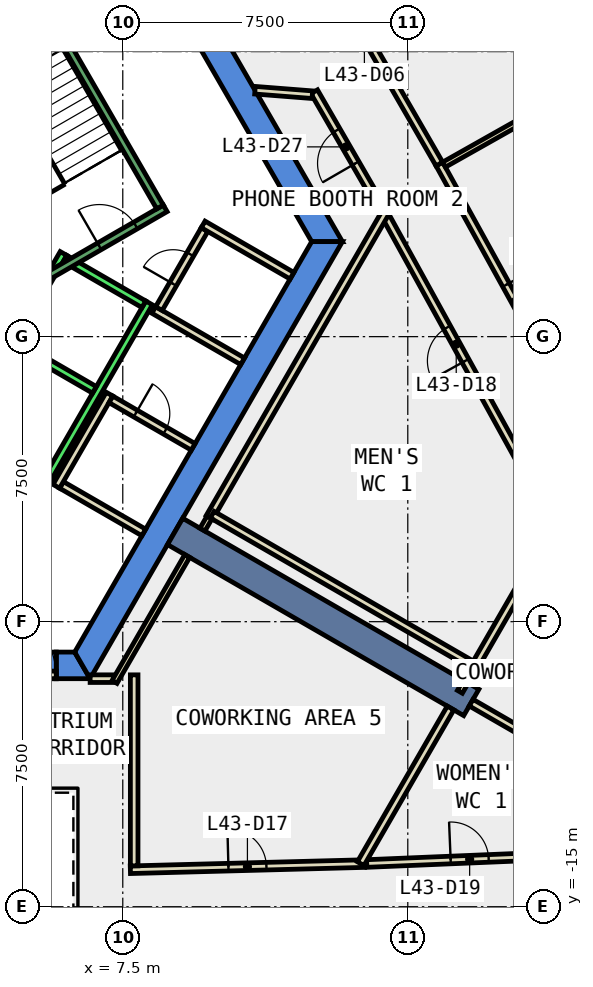
"""IFC4 building model, lengths in metres.
Left out: names, types, materials, properties, quantities, classifications, styles, units other than length and angle.
Written with IfcOpenShell. Run it as: python <this file> out.ifc"""

import sys

from ifc_helpers import new_model, si_unit, direction, frame, frame_2d, origin, place, context, subcontext, project, spatial, polyline, rectangle, outline, extrude, element, fill, save


model = new_model("IFC4")
c1 = context("Model", 3, precision=1e-05, world=origin(), true_north=direction((0.0, 1.0)))
c2 = subcontext(c1, "Body", "Model", "MODEL_VIEW")
j1 = project(units=[si_unit("LENGTHUNIT", "METRE"), si_unit("PLANEANGLEUNIT", "RADIAN")], contexts=[c1])
p1 = place(None, origin())
s1 = spatial("IfcSite", under=j1, at=p1, CompositionType="ELEMENT")
p2 = place(p1, origin())
s2 = spatial("IfcBuilding", under=s1, at=p2, CompositionType="ELEMENT")
p3 = place(p2, frame((0.0, 0.0, 194.0)))
s3 = spatial("IfcBuildingStorey", under=s2, at=p3, CompositionType="ELEMENT", Elevation=194.0)
p4 = place(p3, frame((0.0, 0.0, -0.4)))
e1 = element("IfcWall", 1, at=p4, inside=s3, PredefinedType="SHEAR", context=c2, shape_type="SweptSolid", body=[
    extrude(outline(polyline([(8.084, 11.498), (7.478, 11.148), (12.471, 2.5), (13.279, 2.5), (8.084, 11.498)])), origin(), (0.0, 0.0, 1.0), 4.2),
])
p5 = place(p3, frame((0.0, 0.0, -0.4)))
e2 = element("IfcWall", 2, at=p5, inside=s3, PredefinedType="SHEAR", context=c2, shape_type="SweptSolid", body=[
    extrude(outline(polyline([(5.75, -8.3), (5.75, -9.0), (6.64, -9.0), (6.235, -8.3), (5.75, -8.3)])), origin(), (0.0, 0.0, 1.0), 4.2),
])
p6 = place(p3, frame((0.0, 0.0, 3.6)))
e3 = element("IfcWall", 3, at=p6, inside=s3, PredefinedType="SHEAR", context=c2, shape_type="SweptSolid", body=[
    extrude(outline(polyline([(5.75, -9.0), (5.75, -8.3), (3.75, -8.3), (3.75, -9.0), (5.75, -9.0)])), origin(), (0.0, 0.0, 1.0), 0.2),
])
p7 = place(p3, frame((0.0, 0.0, -0.4)))
e4 = element("IfcWall", 4, at=p7, inside=s3, PredefinedType="SHEAR", context=c2, shape_type="SweptSolid", body=[
    extrude(outline(polyline([(6.64, -9.0), (13.279, 2.5), (12.471, 2.5), (6.235, -8.3), (6.64, -9.0)])), origin(), (0.0, 0.0, 1.0), 4.2),
])
p8 = place(p3, frame((8.877, -5.125, -0.4), z_axis=(0.0, 0.0, 1.0), x_axis=(0.866017533419, -0.500013631625, 0.0)))
e5 = element("IfcWall", 5, at=p8, inside=s3, PredefinedType="SHEAR", context=c2, shape_type="SweptSolid", body=[
    extrude(rectangle(XDim=9.0, YDim=0.8, at=frame_2d((4.5, 0.0))), origin(), (0.0, 0.0, 1.0), 4.2),
])
p9 = place(p3, frame((14.213, 3.543, 0.0), z_axis=(0.0, 0.0, 1.0), x_axis=(-0.500182898346, 0.865919781621, 0.0)))
e6 = element("IfcWall", 6, at=p9, inside=s3, PredefinedType="PARTITIONING", context=c2, shape_type="SweptSolid", body=[
    extrude(rectangle(XDim=3.35, YDim=0.2, at=frame_2d((1.675, 0.0))), origin(), (0.0, 0.0, 1.0), 3.8),
])
p10 = place(p9, frame((1.175, 0.0, 0.0)))
e7 = element("IfcOpeningElement", 7, at=p10, cuts=e6, PredefinedType="OPENING", context=c2, shape_type="SweptSolid", body=[
    extrude(rectangle(XDim=1.0, YDim=2.1, at=frame_2d((0.5, 1.05))), frame((0.0, 0.11, 0.0), z_axis=(0.0, -1.0, 0.0), x_axis=(1.0, 0.0, 0.0)), (0.0, 0.0, 1.0), 0.22),
])
p11 = place(p3, frame((12.488, 6.366, 0.0), z_axis=(0.0, 0.0, 1.0), x_axis=(-0.996960771308, 0.077905201835, 0.0)))
e8 = element("IfcWall", 8, at=p11, inside=s3, PredefinedType="PARTITIONING", context=c2, shape_type="SweptSolid", body=[
    extrude(rectangle(XDim=1.514, YDim=0.2, at=frame_2d((0.757, 0.0))), origin(), (0.0, 0.0, 1.0), 3.8),
])
p12 = place(p3, frame((7.7, -14.027, 0.0), z_axis=(0.0, 0.0, 1.0), x_axis=(0.999653919353, 0.026306682088, 0.0)))
e9 = element("IfcWall", 9, at=p12, inside=s3, PredefinedType="PARTITIONING", context=c2, shape_type="SweptSolid", body=[
    extrude(rectangle(XDim=6.162, YDim=0.2, at=frame_2d((3.081, 0.0))), origin(), (0.0, 0.0, 1.0), 3.8),
])
p13 = place(p12, frame((2.581, 0.0, 0.0)))
e10 = element("IfcOpeningElement", 10, at=p13, cuts=e9, PredefinedType="OPENING", context=c2, shape_type="SweptSolid", body=[
    extrude(rectangle(XDim=1.0, YDim=2.1, at=frame_2d((0.5, 1.05))), frame((0.0, 0.11, 0.0), z_axis=(0.0, -1.0, 0.0), x_axis=(1.0, 0.0, 0.0)), (0.0, 0.0, 1.0), 0.22),
])
p14 = place(p3, frame((18.112, -3.531, 0.0), z_axis=(0.0, 0.0, 1.0), x_axis=(-0.482800061144, 0.875730609811, 0.0)))
e11 = element("IfcWall", 11, at=p14, inside=s3, PredefinedType="PARTITIONING", context=c2, shape_type="SweptSolid", body=[
    extrude(rectangle(XDim=7.612, YDim=0.2, at=frame_2d((3.806, 0.0))), origin(), (0.0, 0.0, 1.0), 3.8),
])
p15 = place(p14, frame((3.306, 0.0, 0.0)))
e12 = element("IfcOpeningElement", 12, at=p15, cuts=e11, PredefinedType="OPENING", context=c2, shape_type="SweptSolid", body=[
    extrude(rectangle(XDim=1.0, YDim=2.1, at=frame_2d((0.5, 1.05))), frame((0.0, 0.11, 0.0), z_axis=(0.0, -1.0, 0.0), x_axis=(1.0, 0.0, 0.0)), (0.0, 0.0, 1.0), 0.22),
])
p16 = place(p3, frame((13.919, -13.863, 0.0), z_axis=(0.0, 0.0, 1.0), x_axis=(0.999130261307, 0.041697972867, 0.0)))
e13 = element("IfcWall", 13, at=p16, inside=s3, PredefinedType="PARTITIONING", context=c2, shape_type="SweptSolid", body=[
    extrude(rectangle(XDim=5.422, YDim=0.2, at=frame_2d((2.711, 0.0))), origin(), (0.0, 0.0, 1.0), 3.8),
])
p17 = place(p16, frame((2.211, 0.0, 0.0)))
e14 = element("IfcOpeningElement", 14, at=p17, cuts=e13, PredefinedType="OPENING", context=c2, shape_type="SweptSolid", body=[
    extrude(rectangle(XDim=1.0, YDim=2.1, at=frame_2d((0.5, 1.05))), frame((0.0, 0.11, 0.0), z_axis=(0.0, -1.0, 0.0), x_axis=(1.0, 0.0, 0.0)), (0.0, 0.0, 1.0), 0.22),
])
p18 = place(p3, frame((15.831, 4.542, 0.0), z_axis=(0.0, 0.0, 1.0), x_axis=(0.482835531749, -0.875711053533, 0.0)))
e15 = element("IfcWall", 15, at=p18, inside=s3, PredefinedType="PARTITIONING", context=c2, shape_type="SweptSolid", body=[
    extrude(rectangle(XDim=8.115, YDim=0.2, at=frame_2d((4.057, 0.0))), origin(), (0.0, 0.0, 1.0), 3.8),
])
p19 = place(p18, frame((3.632, 0.0, 0.0)))
e16 = element("IfcOpeningElement", 16, at=p19, cuts=e15, PredefinedType="OPENING", context=c2, shape_type="SweptSolid", body=[
    extrude(rectangle(XDim=1.0, YDim=2.1, at=frame_2d((0.5, 1.05))), frame((0.0, 0.11, 0.0), z_axis=(0.0, -1.0, 0.0), x_axis=(1.0, 0.0, 0.0)), (0.0, 0.0, 1.0), 0.22),
])
p20 = place(p3, frame((11.811, 11.503, 0.0), z_axis=(0.0, 0.0, 1.0), x_axis=(0.500013420409, -0.866017655369, 0.0)))
e17 = element("IfcWall", 17, at=p20, inside=s3, PredefinedType="PARTITIONING", context=c2, shape_type="SweptSolid", body=[
    extrude(rectangle(XDim=8.038, YDim=0.2, at=frame_2d((4.019, 0.0))), origin(), (0.0, 0.0, 1.0), 3.8),
])
p21 = place(p20, frame((3.594, 0.0, 0.0)))
e18 = element("IfcOpeningElement", 18, at=p21, cuts=e17, PredefinedType="OPENING", context=c2, shape_type="SweptSolid", body=[
    extrude(rectangle(XDim=1.0, YDim=2.1, at=frame_2d((0.5, 1.05))), frame((0.0, 0.11, 0.0), z_axis=(0.0, -1.0, 0.0), x_axis=(1.0, 0.0, 0.0)), (0.0, 0.0, 1.0), 0.22),
])
p22 = place(p3, frame((8.053, -5.152, 0.0), z_axis=(0.0, 0.0, 1.0), x_axis=(-0.866022959057, 0.500004234368, 0.0)))
e19 = element("IfcWall", 19, at=p22, inside=s3, PredefinedType="PARTITIONING", context=c2, shape_type="SweptSolid", body=[
    extrude(rectangle(XDim=2.5, YDim=0.2, at=frame_2d((1.25, 0.0))), origin(), (0.0, 0.0, 1.0), 3.8),
])
p23 = place(p3, frame((5.751, -3.938, 0.0), z_axis=(0.0, 0.0, 1.0), x_axis=(0.49994636267, 0.866056369097, 0.0)))
e20 = element("IfcWall", 20, at=p23, inside=s3, PredefinedType="PARTITIONING", context=c2, shape_type="SweptSolid", body=[
    extrude(rectangle(XDim=2.8, YDim=0.2, at=frame_2d((1.4, 0.0))), origin(), (0.0, 0.0, 1.0), 3.8),
])
p24 = place(p3, frame((7.188, -1.65, 0.0), z_axis=(0.0, 0.0, 1.0), x_axis=(0.866022959057, -0.500004234368, 0.0)))
e21 = element("IfcWall", 21, at=p24, inside=s3, PredefinedType="PARTITIONING", context=c2, shape_type="SweptSolid", body=[
    extrude(rectangle(XDim=2.5, YDim=0.2, at=frame_2d((1.25, 0.0))), origin(), (0.0, 0.0, 1.0), 3.8),
])
p25 = place(p24, frame((0.75, 0.0, 0.0)))
e22 = element("IfcOpeningElement", 22, at=p25, cuts=e21, PredefinedType="OPENING", context=c2, shape_type="SweptSolid", body=[
    extrude(rectangle(XDim=0.9, YDim=2.1, at=frame_2d((0.45, 1.05))), frame((0.0, 0.11, 0.0), z_axis=(0.0, -1.0, 0.0), x_axis=(1.0, 0.0, 0.0)), (0.0, 0.0, 1.0), 0.22),
])
p26 = place(p3, frame((10.653, -0.648, 0.0), z_axis=(0.0, 0.0, 1.0), x_axis=(-0.866036505625, 0.499980770555, 0.0)))
e23 = element("IfcWall", 23, at=p26, inside=s3, PredefinedType="PARTITIONING", context=c2, shape_type="SweptSolid", body=[
    extrude(rectangle(XDim=2.7, YDim=0.2, at=frame_2d((1.35, 0.0))), origin(), (0.0, 0.0, 1.0), 3.8),
])
p27 = place(p3, frame((8.451, 0.738, 0.0), z_axis=(0.0, 0.0, 1.0), x_axis=(0.499913221443, 0.866075499611, 0.0)))
e24 = element("IfcWall", 24, at=p27, inside=s3, PredefinedType="PARTITIONING", context=c2, shape_type="SweptSolid", body=[
    extrude(rectangle(XDim=2.4, YDim=0.2, at=frame_2d((1.2, 0.0))), origin(), (0.0, 0.0, 1.0), 3.8),
])
p28 = place(p27, frame((0.75, 0.0, 0.0)))
e25 = element("IfcOpeningElement", 25, at=p28, cuts=e24, PredefinedType="OPENING", context=c2, shape_type="SweptSolid", body=[
    extrude(rectangle(XDim=0.9, YDim=2.1, at=frame_2d((0.45, 1.05))), frame((0.0, 0.11, 0.0), z_axis=(0.0, -1.0, 0.0), x_axis=(1.0, 0.0, 0.0)), (0.0, 0.0, 1.0), 0.22),
])
p29 = place(p3, frame((9.615, 2.953, 0.0), z_axis=(0.0, 0.0, 1.0), x_axis=(0.866013897511, -0.50001992892, 0.0)))
e26 = element("IfcWall", 26, at=p29, inside=s3, PredefinedType="PARTITIONING", context=c2, shape_type="SweptSolid", body=[
    extrude(rectangle(XDim=2.7, YDim=0.2, at=frame_2d((1.35, 0.0))), origin(), (0.0, 0.0, 1.0), 3.8),
])
p30 = place(p3, frame((6.641, -8.999, 0.0), z_axis=(0.0, 0.0, 1.0), x_axis=(1.0, 0.0, 0.0)))
e27 = element("IfcWall", 27, at=p30, inside=s3, PredefinedType="PARTITIONING", context=c2, shape_type="SweptSolid", body=[
    extrude(rectangle(XDim=0.617, YDim=0.2, at=frame_2d((0.309, 0.0))), origin(), (0.0, 0.0, 1.0), 3.8),
])
p31 = place(p3, frame((7.283, -9.086, 0.0), z_axis=(0.0, 0.0, 1.0), x_axis=(0.499843936326, 0.866115488442, 0.0)))
e28 = element("IfcWall", 28, at=p31, inside=s3, PredefinedType="PARTITIONING", context=c2, shape_type="SweptSolid", body=[
    extrude(rectangle(XDim=3.827, YDim=0.15, at=frame_2d((1.914, 0.0))), origin(), (0.0, 0.0, 1.0), 3.8),
])
p32 = place(p3, frame((9.781, -4.758, 0.0), z_axis=(0.0, 0.0, 1.0), x_axis=(0.50003174578, 0.866007074574, 0.0)))
e29 = element("IfcWall", 29, at=p32, inside=s3, PredefinedType="PARTITIONING", context=c2, shape_type="SweptSolid", body=[
    extrude(rectangle(XDim=9.315, YDim=0.2, at=frame_2d((4.658, 0.0))), origin(), (0.0, 0.0, 1.0), 3.8),
])
p33 = place(p3, frame((7.8, -8.899, 0.0), z_axis=(0.0, 0.0, 1.0), x_axis=(0.0, -1.0, 0.0)))
e30 = element("IfcWall", 30, at=p33, inside=s3, PredefinedType="PARTITIONING", context=c2, shape_type="SweptSolid", body=[
    extrude(rectangle(XDim=5.025, YDim=0.2, at=frame_2d((2.513, 0.0))), origin(), (0.0, 0.0, 1.0), 3.8),
])
p34 = place(p3, frame((9.853, -4.684, 0.0), z_axis=(0.0, 0.0, 1.0), x_axis=(0.865999791918, -0.500044358431, 0.0)))
e31 = element("IfcWall", 31, at=p34, inside=s3, PredefinedType="PARTITIONING", context=c2, shape_type="SweptSolid", body=[
    extrude(rectangle(XDim=8.075, YDim=0.2, at=frame_2d((4.038, 0.0))), origin(), (0.0, 0.0, 1.0), 3.8),
])
p35 = place(p3, frame((16.125, -9.771, 0.0), z_axis=(0.0, 0.0, 1.0), x_axis=(-0.500030759312, -0.866007644159, 0.0)))
e32 = element("IfcWall", 32, at=p35, inside=s3, PredefinedType="PARTITIONING", context=c2, shape_type="SweptSolid", body=[
    extrude(rectangle(XDim=4.73, YDim=0.2, at=frame_2d((2.365, 0.0))), origin(), (0.0, 0.0, 1.0), 3.8),
])
p36 = place(p3, frame((16.71, -8.758, 0.0), z_axis=(0.0, 0.0, 1.0), x_axis=(-0.500013496215, -0.866017611601, 0.0)))
e33 = element("IfcWall", 33, at=p36, inside=s3, PredefinedType="PARTITIONING", context=c2, shape_type="SweptSolid", body=[
    extrude(rectangle(XDim=0.678, YDim=0.15, at=frame_2d((0.339, 0.0))), origin(), (0.0, 0.0, 1.0), 3.8),
])
p37 = place(p3, frame((18.882, -4.995, 0.0), z_axis=(0.0, 0.0, 1.0), x_axis=(-0.499895813511, -0.866085547527, 0.0)))
e34 = element("IfcWall", 34, at=p37, inside=s3, PredefinedType="PARTITIONING", context=c2, shape_type="SweptSolid", body=[
    extrude(rectangle(XDim=4.145, YDim=0.2, at=frame_2d((2.073, 0.0))), origin(), (0.0, 0.0, 1.0), 3.8),
])
p38 = place(p3, frame((16.667, -9.631, 0.0), z_axis=(0.0, 0.0, 1.0), x_axis=(0.866032775405, -0.499987231761, 0.0)))
e35 = element("IfcWall", 35, at=p38, inside=s3, PredefinedType="PARTITIONING", context=c2, shape_type="SweptSolid", body=[
    extrude(rectangle(XDim=5.8, YDim=0.2, at=frame_2d((2.9, 0.0))), origin(), (0.0, 0.0, 1.0), 3.8),
])
p39 = place(p3, frame((15.954, 4.526, 0.0), z_axis=(0.0, 0.0, 1.0), x_axis=(0.870940016277, 0.491389344663, 0.0)))
e36 = element("IfcWall", 36, at=p39, inside=s3, PredefinedType="PARTITIONING", context=c2, shape_type="SweptSolid", body=[
    extrude(rectangle(XDim=4.18, YDim=0.15, at=frame_2d((2.09, 0.0))), origin(), (0.0, 0.0, 1.0), 3.8),
])
p40 = place(p3, frame((3.75, -8.9, 0.0), z_axis=(0.0, 0.0, 1.0), x_axis=(1.0, 0.0, 0.0)))
e37 = element("IfcWall", 37, at=p40, inside=s3, PredefinedType="PARTITIONING", context=c2, shape_type="SweptSolid", body=[
    extrude(rectangle(XDim=2.0, YDim=0.2, at=frame_2d((1.0, 0.0))), origin(), (0.0, 0.0, 1.0), 2.4),
])
p41 = place(p40, frame((0.19, 0.0, 0.0)))
e38 = element("IfcOpeningElement", 38, at=p41, cuts=e37, PredefinedType="OPENING", context=c2, shape_type="SweptSolid", body=[
    extrude(rectangle(XDim=1.8, YDim=2.1, at=frame_2d((0.9, 1.05))), frame((0.0, 0.11, 0.0), z_axis=(0.0, -1.0, 0.0), x_axis=(1.0, 0.0, 0.0)), (0.0, 0.0, 1.0), 0.22),
])
p42 = place(p3, frame((9.596, -5.078, 0.0), z_axis=(0.0, 0.0, 1.0), x_axis=(0.500827895298, 0.86554689029, 0.0)))
e39 = element("IfcWall", 39, at=p42, inside=s3, PredefinedType="PARTITIONING", context=c2, shape_type="SweptSolid", body=[
    extrude(rectangle(XDim=0.369, YDim=0.15, at=frame_2d((0.185, 0.0))), origin(), (0.0, 0.0, 1.0), 3.8),
])
p43 = place(p3, frame((3.24, -2.488, 0.0), z_axis=(0.0, 0.0, 1.0), x_axis=(0.500034260056, 0.866005622828, 0.0)))
e40 = element("IfcWall", 40, at=p43, inside=s3, PredefinedType="STANDARD", context=c2, shape_type="SweptSolid", body=[
    extrude(rectangle(XDim=5.399, YDim=0.2, at=frame_2d((2.7, 0.0))), origin(), (0.0, 0.0, 1.0), 3.8),
])
p44 = place(p43, frame((3.225, 0.0, 0.0)))
e41 = element("IfcOpeningElement", 41, at=p44, cuts=e40, PredefinedType="OPENING", context=c2, shape_type="SweptSolid", body=[
    extrude(rectangle(XDim=1.1, YDim=2.1, at=frame_2d((0.55, 1.05))), frame((0.0, 0.11, 0.0), z_axis=(0.0, -1.0, 0.0), x_axis=(1.0, 0.0, 0.0)), (0.0, 0.0, 1.0), 0.22),
])
p45 = place(p43, frame((1.225, 0.0, 0.0)))
e42 = element("IfcOpeningElement", 42, at=p45, cuts=e40, PredefinedType="OPENING", context=c2, shape_type="SweptSolid", body=[
    extrude(rectangle(XDim=1.1, YDim=2.1, at=frame_2d((0.55, 1.05))), frame((0.0, 0.11, 0.0), z_axis=(0.0, -1.0, 0.0), x_axis=(1.0, 0.0, 0.0)), (0.0, 0.0, 1.0), 0.22),
])
p46 = place(p3, frame((5.492, -3.788, 0.0), z_axis=(0.0, 0.0, 1.0), x_axis=(0.500034260056, 0.866005622828, 0.0)))
e43 = element("IfcWall", 43, at=p46, inside=s3, PredefinedType="STANDARD", context=c2, shape_type="SweptSolid", body=[
    extrude(rectangle(XDim=5.399, YDim=0.2, at=frame_2d((2.7, 0.0))), origin(), (0.0, 0.0, 1.0), 3.8),
])
for number, where, z_axis, x_axis in (
    (44, (4.677, -0.2, 0.0), (0.0, 0.0, 1.0), (0.866, -0.5, 0.0)),
    (45, (5.977, 2.052, 0.0), (0.0, 0.0, 1.0), (0.866, -0.5, 0.0)),
):
    element("IfcWall", number, at=place(p3, frame(where, z_axis=z_axis, x_axis=x_axis)), inside=s3, PredefinedType="STANDARD", context=c2, shape_type="SweptSolid", body=[
        extrude(rectangle(XDim=2.399, YDim=0.2, at=frame_2d((1.2, 0.0))), origin(), (0.0, 0.0, 1.0), 3.8),
    ])
p47 = place(p3, frame((4.806, 1.176, 0.0), z_axis=(0.0, 0.0, 1.0), x_axis=(0.866059941101, 0.499940174841, 0.0)))
e46 = element("IfcWall", 46, at=p47, inside=s3, PredefinedType="STANDARD", context=c2, shape_type="SweptSolid", body=[
    extrude(rectangle(XDim=4.4, YDim=0.2, at=frame_2d((2.2, 0.0))), origin(), (0.0, 0.0, 1.0), 3.8),
])
p48 = place(p47, frame((2.4, 0.0, 0.0)))
e47 = element("IfcOpeningElement", 47, at=p48, cuts=e46, PredefinedType="OPENING", context=c2, shape_type="SweptSolid", body=[
    extrude(rectangle(XDim=1.1, YDim=2.2, at=frame_2d((0.55, 1.1))), frame((0.0, 0.11, 0.0), z_axis=(0.0, -1.0, 0.0), x_axis=(1.0, 0.0, 0.0)), (0.0, 0.0, 1.0), 0.22),
])
p49 = place(p3, frame((8.48, 3.412, 0.0), z_axis=(0.0, 0.0, 1.0), x_axis=(-0.499978703459, 0.866037698999, 0.0)))
e48 = element("IfcWall", 48, at=p49, inside=s3, PredefinedType="STANDARD", context=c2, shape_type="SweptSolid", body=[
    extrude(rectangle(XDim=6.9, YDim=0.2, at=frame_2d((3.45, 0.0))), origin(), (0.0, 0.0, 1.0), 3.8),
])
p50 = place(p19, origin())
e49 = element("IfcDoor", 49, at=p50, inside=s3, OperationType="SINGLE_SWING_RIGHT", PredefinedType="DOOR", context=c2, shape_type="SweptSolid", body=[
    extrude(rectangle(XDim=1.0, YDim=2.1, at=frame_2d((0.5, 1.05))), frame((0.0, 0.025, 0.0), z_axis=(0.0, -1.0, 0.0), x_axis=(1.0, 0.0, 0.0)), (0.0, 0.0, 1.0), 0.05),
])
fill(e16, e49)
p51 = place(p13, origin())
e50 = element("IfcDoor", 50, at=p51, inside=s3, OperationType="SINGLE_SWING_LEFT", PredefinedType="DOOR", context=c2, shape_type="SweptSolid", body=[
    extrude(rectangle(XDim=1.0, YDim=2.1, at=frame_2d((0.5, 1.05))), frame((0.0, 0.025, 0.0), z_axis=(0.0, -1.0, 0.0), x_axis=(1.0, 0.0, 0.0)), (0.0, 0.0, 1.0), 0.05),
])
fill(e10, e50)
p52 = place(p15, origin())
e51 = element("IfcDoor", 51, at=p52, inside=s3, OperationType="SINGLE_SWING_LEFT", PredefinedType="DOOR", context=c2, shape_type="SweptSolid", body=[
    extrude(rectangle(XDim=1.0, YDim=2.1, at=frame_2d((0.5, 1.05))), frame((0.0, 0.025, 0.0), z_axis=(0.0, -1.0, 0.0), x_axis=(1.0, 0.0, 0.0)), (0.0, 0.0, 1.0), 0.05),
])
fill(e12, e51)
p53 = place(p17, origin())
e52 = element("IfcDoor", 52, at=p53, inside=s3, OperationType="SINGLE_SWING_LEFT", PredefinedType="DOOR", context=c2, shape_type="SweptSolid", body=[
    extrude(rectangle(XDim=1.0, YDim=2.1, at=frame_2d((0.5, 1.05))), frame((0.0, 0.025, 0.0), z_axis=(0.0, -1.0, 0.0), x_axis=(1.0, 0.0, 0.0)), (0.0, 0.0, 1.0), 0.05),
])
fill(e14, e52)
p54 = place(p10, origin())
e53 = element("IfcDoor", 53, at=p54, inside=s3, OperationType="SINGLE_SWING_LEFT", PredefinedType="DOOR", context=c2, shape_type="SweptSolid", body=[
    extrude(rectangle(XDim=1.0, YDim=2.1, at=frame_2d((0.5, 1.05))), frame((0.0, 0.025, 0.0), z_axis=(0.0, -1.0, 0.0), x_axis=(1.0, 0.0, 0.0)), (0.0, 0.0, 1.0), 0.05),
])
fill(e7, e53)
p55 = place(p25, origin())
e54 = element("IfcDoor", 54, at=p55, inside=s3, OperationType="SINGLE_SWING_RIGHT", PredefinedType="DOOR", context=c2, shape_type="SweptSolid", body=[
    extrude(rectangle(XDim=0.9, YDim=2.1, at=frame_2d((0.45, 1.05))), frame((0.0, 0.025, 0.0), z_axis=(0.0, -1.0, 0.0), x_axis=(1.0, 0.0, 0.0)), (0.0, 0.0, 1.0), 0.05),
])
fill(e22, e54)
p56 = place(p28, origin())
e55 = element("IfcDoor", 55, at=p56, inside=s3, OperationType="SINGLE_SWING_LEFT", PredefinedType="DOOR", context=c2, shape_type="SweptSolid", body=[
    extrude(rectangle(XDim=0.9, YDim=2.1, at=frame_2d((0.45, 1.05))), frame((0.0, 0.025, 0.0), z_axis=(0.0, -1.0, 0.0), x_axis=(1.0, 0.0, 0.0)), (0.0, 0.0, 1.0), 0.05),
])
fill(e25, e55)
p57 = place(p41, origin())
e56 = element("IfcDoor", 56, at=p57, inside=s3, OperationType="DOUBLE_DOOR_SINGLE_SWING", PredefinedType="DOOR", context=c2, shape_type="SweptSolid", body=[
    extrude(rectangle(XDim=1.8, YDim=2.1, at=frame_2d((0.9, 1.05))), frame((0.0, 0.025, 0.0), z_axis=(0.0, -1.0, 0.0), x_axis=(1.0, 0.0, 0.0)), (0.0, 0.0, 1.0), 0.05),
])
fill(e38, e56)
p58 = place(p48, origin())
e57 = element("IfcDoor", 57, at=p58, inside=s3, OperationType="SINGLE_SWING_LEFT", PredefinedType="DOOR", context=c2, shape_type="SweptSolid", body=[
    extrude(rectangle(XDim=1.1, YDim=2.2, at=frame_2d((0.55, 1.1))), frame((0.0, 0.025, 0.0), z_axis=(0.0, -1.0, 0.0), x_axis=(1.0, 0.0, 0.0)), (0.0, 0.0, 1.0), 0.05),
])
fill(e47, e57)
save(model, sys.argv[1])
